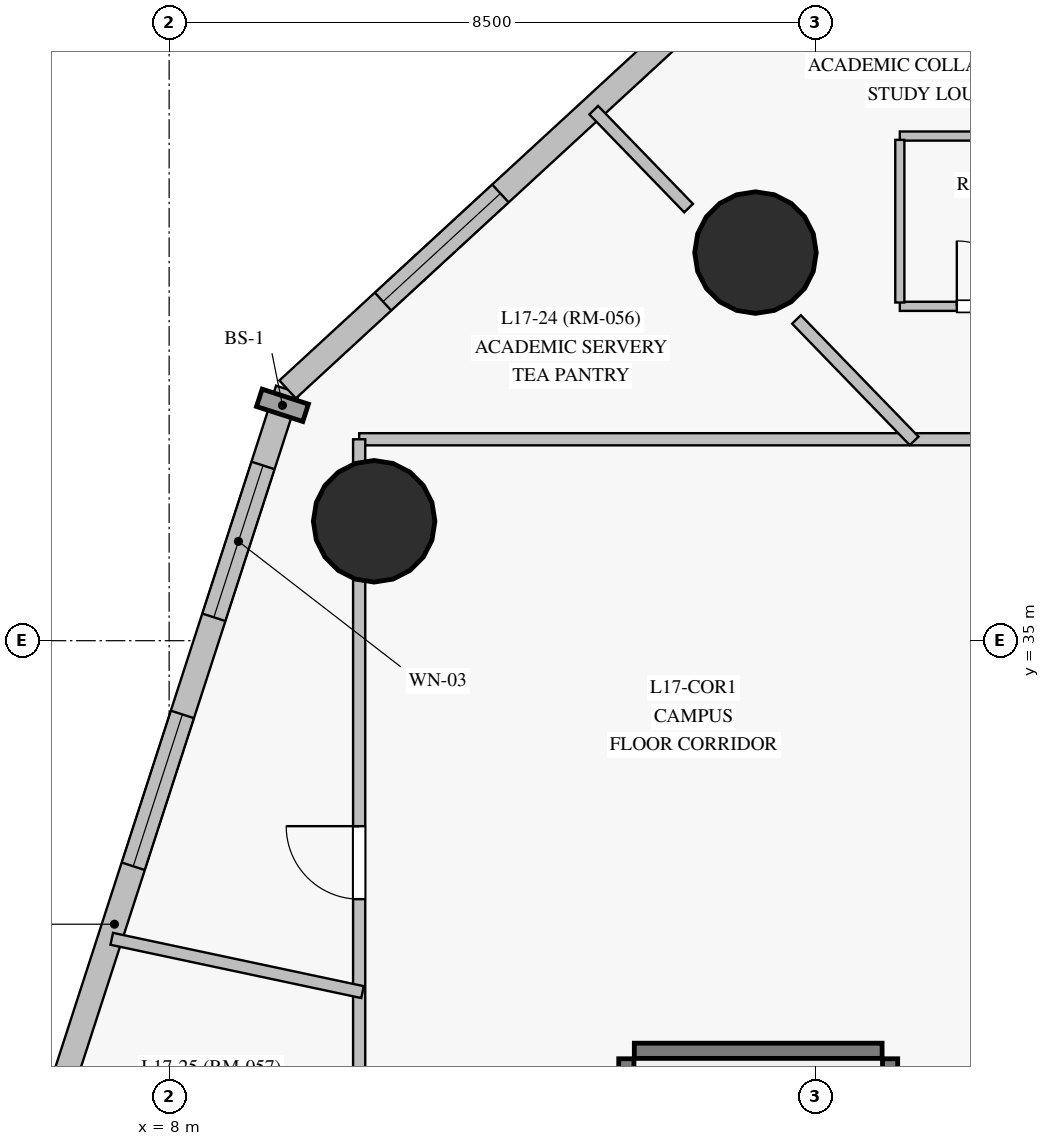
"""IFC4 building model, lengths in metres.
Left out: names, types, materials, properties, quantities, classifications, styles, units other than length and angle.
Written with IfcOpenShell. Run it as: python <this file> out.ifc"""

import sys

from ifc_helpers import new_model, si_unit, direction, frame, frame_2d, origin, origin_with_axes, origin_2d, place, context, subcontext, project, spatial, rectangle, circle, extrude, source, transform, mapped, element, fill, save


model = new_model("IFC4")
c1 = context("Model", 3, precision=1e-05, world=origin(), true_north=direction((0.0, 1.0)))
c2 = subcontext(c1, "Body", "Model", "MODEL_VIEW")
j1 = project(units=[si_unit("LENGTHUNIT", "METRE"), si_unit("PLANEANGLEUNIT", "RADIAN")], contexts=[c1])
p1 = place(None, origin())
s1 = spatial("IfcSite", under=j1, at=p1, CompositionType="ELEMENT")
p2 = place(p1, origin())
s2 = spatial("IfcBuilding", under=s1, at=p2, CompositionType="ELEMENT")
p3 = place(p2, frame((0.0, 0.0, 66.1)))
s3 = spatial("IfcBuildingStorey", under=s2, at=p3, CompositionType="ELEMENT", Elevation=66.1)
m1 = source(origin_with_axes(), c2, "Body", "SweptSolid", [
    extrude(circle(Radius=0.8, at=origin_2d()), origin(), (0.0, 0.0, 1.0), 3.6),
])
for number, where, z_axis, x_axis in (
    (1, (15.714, 40.106, 0.0), (0.0, 0.0, 1.0), (1.0, 0.0, 0.0)),
    (2, (10.697, 36.571, 0.0), (0.0, 0.0, 1.0), (1.0, 0.0, 0.0)),
):
    element("IfcColumn", number, at=place(p3, frame(where, z_axis=z_axis, x_axis=x_axis)), inside=s3, PredefinedType="COLUMN", context=c2, shape_type="MappedRepresentation", body=[
        mapped(m1, transform((0.0, 0.0, 0.0), scale=1.0)),
    ])
p4 = place(p3, frame((9.559, 38.306, 0.0), z_axis=(0.0, 0.0, 1.0), x_axis=(-0.30804045588, -0.95137325879, 0.0)))
e3 = element("IfcWall", 3, at=p4, inside=s3, PredefinedType="SOLIDWALL", context=c2, shape_type="SweptSolid", body=[
    extrude(rectangle(XDim=14.791, YDim=0.32, at=frame_2d((7.396, 0.0))), origin(), (0.0, 0.0, 1.0), 3.35),
])
p5 = place(p4, frame((1.052, 0.0, 0.85)))
e4 = element("IfcOpeningElement", 4, at=p5, cuts=e3, PredefinedType="OPENING", context=c2, shape_type="SweptSolid", body=[
    extrude(rectangle(XDim=2.1, YDim=1.95, at=frame_2d((1.05, 0.975))), frame((0.0, 0.17, 0.0), z_axis=(0.0, -1.0, 0.0), x_axis=(1.0, 0.0, 0.0)), (0.0, 0.0, 1.0), 0.34),
])
p6 = place(p4, frame((4.494, 0.0, 0.85)))
e5 = element("IfcOpeningElement", 5, at=p6, cuts=e3, PredefinedType="OPENING", context=c2, shape_type="SweptSolid", body=[
    extrude(rectangle(XDim=2.1, YDim=1.95, at=frame_2d((1.05, 0.975))), frame((0.0, 0.17, 0.0), z_axis=(0.0, -1.0, 0.0), x_axis=(1.0, 0.0, 0.0)), (0.0, 0.0, 1.0), 0.34),
])
p7 = place(p4, frame((10.022, 0.0, 0.85)))
e6 = element("IfcOpeningElement", 6, at=p7, cuts=e3, PredefinedType="OPENING", context=c2, shape_type="SweptSolid", body=[
    extrude(rectangle(XDim=2.1, YDim=1.95, at=frame_2d((1.05, 0.975))), frame((0.0, 0.17, 0.0), z_axis=(0.0, -1.0, 0.0), x_axis=(1.0, 0.0, 0.0)), (0.0, 0.0, 1.0), 0.34),
])
p8 = place(p3, frame((18.293, 46.348, 0.0), z_axis=(0.0, 0.0, 1.0), x_axis=(-0.735624378621, -0.677389676316, 0.0)))
e7 = element("IfcWall", 7, at=p8, inside=s3, PredefinedType="SOLIDWALL", context=c2, shape_type="SweptSolid", body=[
    extrude(rectangle(XDim=11.873, YDim=0.32, at=frame_2d((5.937, 0.0))), origin(), (0.0, 0.0, 1.0), 3.35),
])
p9 = place(p8, frame((2.19, 0.0, 0.85)))
e8 = element("IfcOpeningElement", 8, at=p9, cuts=e7, PredefinedType="OPENING", context=c2, shape_type="SweptSolid", body=[
    extrude(rectangle(XDim=2.1, YDim=1.95, at=frame_2d((1.05, 0.975))), frame((0.0, 0.17, 0.0), z_axis=(0.0, -1.0, 0.0), x_axis=(1.0, 0.0, 0.0)), (0.0, 0.0, 1.0), 0.34),
])
p10 = place(p8, frame((8.067, 0.0, 0.85)))
e9 = element("IfcOpeningElement", 9, at=p10, cuts=e7, PredefinedType="OPENING", context=c2, shape_type="SweptSolid", body=[
    extrude(rectangle(XDim=2.1, YDim=1.95, at=frame_2d((1.05, 0.975))), frame((0.0, 0.17, 0.0), z_axis=(0.0, -1.0, 0.0), x_axis=(1.0, 0.0, 0.0)), (0.0, 0.0, 1.0), 0.34),
])
p11 = place(p3, frame((14.015, 22.15, 0.0), z_axis=(0.0, 0.0, 1.0), x_axis=(0.0, 1.0, 0.0)))
e10 = element("IfcWall", 10, at=p11, inside=s3, PredefinedType="SHEAR", context=c2, shape_type="SweptSolid", body=[
    extrude(rectangle(XDim=7.35, YDim=0.2, at=frame_2d((3.675, 0.0))), origin(), (0.0, 0.0, 1.0), 3.35),
])
p12 = place(p3, frame((17.485, 22.15, 0.0), z_axis=(0.0, 0.0, 1.0), x_axis=(0.0, 1.0, 0.0)))
e11 = element("IfcWall", 11, at=p12, inside=s3, PredefinedType="SHEAR", context=c2, shape_type="SweptSolid", body=[
    extrude(rectangle(XDim=7.35, YDim=0.2, at=frame_2d((3.675, 0.0))), origin(), (0.0, 0.0, 1.0), 3.35),
])
p13 = place(p12, frame((0.35, 0.0, 0.0)))
e12 = element("IfcOpeningElement", 12, at=p13, cuts=e11, PredefinedType="OPENING", context=c2, shape_type="SweptSolid", body=[
    extrude(rectangle(XDim=1.15, YDim=2.15, at=frame_2d((0.575, 1.075))), frame((0.0, 0.11, 0.0), z_axis=(0.0, -1.0, 0.0), x_axis=(1.0, 0.0, 0.0)), (0.0, 0.0, 1.0), 0.22),
])
p14 = place(p3, frame((14.12, 29.605, 0.0), z_axis=(0.0, 0.0, 1.0), x_axis=(1.0, 0.0, 0.0)))
e13 = element("IfcWall", 13, at=p14, inside=s3, PredefinedType="SHEAR", context=c2, shape_type="SweptSolid", body=[
    extrude(rectangle(XDim=3.26, YDim=0.2, at=frame_2d((1.63, 0.0))), origin(), (0.0, 0.0, 1.0), 3.35),
])
p15 = place(p3, frame((10.5, 37.65, 0.0), z_axis=(0.0, 0.0, 1.0), x_axis=(1.0, 0.0, 0.0)))
e14 = element("IfcWall", 14, at=p15, inside=s3, PredefinedType="PARTITIONING", context=c2, shape_type="SweptSolid", body=[
    extrude(rectangle(XDim=29.75, YDim=0.16, at=frame_2d((14.875, 0.0))), origin(), (0.0, 0.0, 1.0), 2.75),
])
p16 = place(p15, frame((27.85, 0.0, 0.0)))
e15 = element("IfcOpeningElement", 15, at=p16, cuts=e14, PredefinedType="OPENING", context=c2, shape_type="SweptSolid", body=[
    extrude(rectangle(XDim=0.95, YDim=2.15, at=frame_2d((0.475, 1.075))), frame((0.0, 0.09, 0.0), z_axis=(0.0, -1.0, 0.0), x_axis=(1.0, 0.0, 0.0)), (0.0, 0.0, 1.0), 0.18),
])
p17 = place(p15, frame((25.159, 0.0, 0.0)))
e16 = element("IfcOpeningElement", 16, at=p17, cuts=e14, PredefinedType="OPENING", context=c2, shape_type="SweptSolid", body=[
    extrude(rectangle(XDim=0.96, YDim=2.15, at=frame_2d((0.48, 1.075))), frame((0.0, 0.09, 0.0), z_axis=(0.0, -1.0, 0.0), x_axis=(1.0, 0.0, 0.0)), (0.0, 0.0, 1.0), 0.18),
])
p18 = place(p15, frame((21.837, 0.0, 0.0)))
e17 = element("IfcOpeningElement", 17, at=p18, cuts=e14, PredefinedType="OPENING", context=c2, shape_type="SweptSolid", body=[
    extrude(rectangle(XDim=0.95, YDim=2.15, at=frame_2d((0.475, 1.075))), frame((0.0, 0.09, 0.0), z_axis=(0.0, -1.0, 0.0), x_axis=(1.0, 0.0, 0.0)), (0.0, 0.0, 1.0), 0.18),
])
p19 = place(p15, frame((18.863, 0.0, 0.0)))
e18 = element("IfcOpeningElement", 18, at=p19, cuts=e14, PredefinedType="OPENING", context=c2, shape_type="SweptSolid", body=[
    extrude(rectangle(XDim=0.95, YDim=2.15, at=frame_2d((0.475, 1.075))), frame((0.0, 0.09, 0.0), z_axis=(0.0, -1.0, 0.0), x_axis=(1.0, 0.0, 0.0)), (0.0, 0.0, 1.0), 0.18),
])
p20 = place(p15, frame((15.14, 0.0, 0.0)))
e19 = element("IfcOpeningElement", 19, at=p20, cuts=e14, PredefinedType="OPENING", context=c2, shape_type="SweptSolid", body=[
    extrude(rectangle(XDim=0.96, YDim=2.15, at=frame_2d((0.48, 1.075))), frame((0.0, 0.09, 0.0), z_axis=(0.0, -1.0, 0.0), x_axis=(1.0, 0.0, 0.0)), (0.0, 0.0, 1.0), 0.18),
])
p21 = place(p15, frame((13.176, 0.0, 0.0)))
e20 = element("IfcOpeningElement", 20, at=p21, cuts=e14, PredefinedType="OPENING", context=c2, shape_type="SweptSolid", body=[
    extrude(rectangle(XDim=0.95, YDim=2.15, at=frame_2d((0.475, 1.075))), frame((0.0, 0.09, 0.0), z_axis=(0.0, -1.0, 0.0), x_axis=(1.0, 0.0, 0.0)), (0.0, 0.0, 1.0), 0.18),
])
p22 = place(p15, frame((9.938, 0.0, 0.0)))
e21 = element("IfcOpeningElement", 21, at=p22, cuts=e14, PredefinedType="OPENING", context=c2, shape_type="SweptSolid", body=[
    extrude(rectangle(XDim=0.95, YDim=2.15, at=frame_2d((0.475, 1.075))), frame((0.0, 0.09, 0.0), z_axis=(0.0, -1.0, 0.0), x_axis=(1.0, 0.0, 0.0)), (0.0, 0.0, 1.0), 0.18),
])
p23 = place(p3, frame((10.5, 15.35, 0.0), z_axis=(0.0, 0.0, 1.0), x_axis=(0.0, 1.0, 0.0)))
e22 = element("IfcWall", 22, at=p23, inside=s3, PredefinedType="PARTITIONING", context=c2, shape_type="SweptSolid", body=[
    extrude(rectangle(XDim=22.3, YDim=0.16, at=frame_2d((11.15, 0.0))), origin(), (0.0, 0.0, 1.0), 2.75),
])
p24 = place(p23, frame((7.33, 0.0, 0.0)))
e23 = element("IfcOpeningElement", 23, at=p24, cuts=e22, PredefinedType="OPENING", context=c2, shape_type="SweptSolid", body=[
    extrude(rectangle(XDim=0.95, YDim=2.15, at=frame_2d((0.475, 1.075))), frame((0.0, 0.09, 0.0), z_axis=(0.0, -1.0, 0.0), x_axis=(1.0, 0.0, 0.0)), (0.0, 0.0, 1.0), 0.18),
])
p25 = place(p23, frame((16.25, 0.0, 0.0)))
e24 = element("IfcOpeningElement", 24, at=p25, cuts=e22, PredefinedType="OPENING", context=c2, shape_type="SweptSolid", body=[
    extrude(rectangle(XDim=0.96, YDim=2.15, at=frame_2d((0.48, 1.075))), frame((0.0, 0.09, 0.0), z_axis=(0.0, -1.0, 0.0), x_axis=(1.0, 0.0, 0.0)), (0.0, 0.0, 1.0), 0.18),
])
p26 = place(p23, frame((10.675, 0.0, 0.0)))
e25 = element("IfcOpeningElement", 25, at=p26, cuts=e22, PredefinedType="OPENING", context=c2, shape_type="SweptSolid", body=[
    extrude(rectangle(XDim=0.95, YDim=2.15, at=frame_2d((0.475, 1.075))), frame((0.0, 0.09, 0.0), z_axis=(0.0, -1.0, 0.0), x_axis=(1.0, 0.0, 0.0)), (0.0, 0.0, 1.0), 0.18),
])
p27 = place(p3, frame((10.544, 30.377, 0.0), z_axis=(0.0, 0.0, 1.0), x_axis=(-0.978166393073, 0.207823260158, 0.0)))
e26 = element("IfcWall", 26, at=p27, inside=s3, PredefinedType="PARTITIONING", context=c2, shape_type="SweptSolid", body=[
    extrude(rectangle(XDim=3.373, YDim=0.16, at=frame_2d((1.687, 0.0))), origin(), (0.0, 0.0, 1.0), 3.35),
])
p28 = place(p3, frame((17.613, 39.399, 0.0), z_axis=(0.0, 0.0, 1.0), x_axis=(1.0, 0.0, 0.0)))
e27 = element("IfcWall", 27, at=p28, inside=s3, PredefinedType="PARTITIONING", context=c2, shape_type="SweptSolid", body=[
    extrude(rectangle(XDim=2.36, YDim=0.12, at=frame_2d((1.18, 0.0))), origin(), (0.0, 0.0, 1.0), 2.75),
])
p29 = place(p28, frame((0.75, 0.0, 0.0)))
e28 = element("IfcOpeningElement", 28, at=p29, cuts=e27, PredefinedType="OPENING", context=c2, shape_type="SweptSolid", body=[
    extrude(rectangle(XDim=0.86, YDim=2.1, at=frame_2d((0.43, 1.05))), frame((0.0, 0.07, 0.0), z_axis=(0.0, -1.0, 0.0), x_axis=(1.0, 0.0, 0.0)), (0.0, 0.0, 1.0), 0.14),
])
p30 = place(p3, frame((19.973, 41.639, 0.0), z_axis=(0.0, 0.0, 1.0), x_axis=(-1.0, 0.0, 0.0)))
e29 = element("IfcWall", 29, at=p30, inside=s3, PredefinedType="PARTITIONING", context=c2, shape_type="SweptSolid", body=[
    extrude(rectangle(XDim=2.36, YDim=0.12, at=frame_2d((1.18, 0.0))), origin(), (0.0, 0.0, 1.0), 2.75),
])
p31 = place(p3, frame((17.802, 37.628, 0.0), z_axis=(0.0, 0.0, 1.0), x_axis=(-0.695823523946, 0.718212798218, 0.0)))
e30 = element("IfcWall", 30, at=p31, inside=s3, PredefinedType="PARTITIONING", context=c2, shape_type="SweptSolid", body=[
    extrude(rectangle(XDim=2.225, YDim=0.16, at=frame_2d((1.112, 0.0))), origin(), (0.0, 0.0, 1.0), 2.7),
])
p32 = place(p3, frame((17.613, 41.589, 0.0), z_axis=(0.0, 0.0, 1.0), x_axis=(0.0, -1.0, 0.0)))
e31 = element("IfcWall", 31, at=p32, inside=s3, PredefinedType="PARTITIONING", context=c2, shape_type="SweptSolid", body=[
    extrude(rectangle(XDim=2.14, YDim=0.12, at=frame_2d((1.07, 0.0))), origin(), (0.0, 0.0, 1.0), 3.35),
])
p33 = place(p3, frame((14.834, 40.691, 0.0), z_axis=(0.0, 0.0, 1.0), x_axis=(-0.695858838833, 0.718178582539, 0.0)))
e32 = element("IfcWall", 32, at=p33, inside=s3, PredefinedType="PARTITIONING", context=c2, shape_type="SweptSolid", body=[
    extrude(rectangle(XDim=1.794, YDim=0.16, at=frame_2d((0.897, 0.0))), origin(), (0.0, 0.0, 1.0), 3.35),
])
m2 = source(origin_with_axes(), c2, "Body", "SweptSolid", [
    extrude(rectangle(XDim=2.1, YDim=1.95, at=frame_2d((1.05, 0.975))), frame((0.0, 0.03, 0.0), z_axis=(0.0, -1.0, 0.0), x_axis=(1.0, 0.0, 0.0)), (0.0, 0.0, 1.0), 0.06),
])
p34 = place(p5, origin())
e33 = element("IfcWindow", 33, at=p34, inside=s3, PartitioningType="SINGLE_PANEL", PredefinedType="WINDOW", context=c2, shape_type="MappedRepresentation", body=[
    mapped(m2, transform((0.0, 0.0, 0.0), scale=1.0)),
])
fill(e4, e33)
p35 = place(p6, origin())
e34 = element("IfcWindow", 34, at=p35, inside=s3, PartitioningType="SINGLE_PANEL", PredefinedType="WINDOW", context=c2, shape_type="MappedRepresentation", body=[
    mapped(m2, transform((0.0, 0.0, 0.0), scale=1.0)),
])
fill(e5, e34)
p36 = place(p10, origin())
e35 = element("IfcWindow", 35, at=p36, inside=s3, PartitioningType="SINGLE_PANEL", PredefinedType="WINDOW", context=c2, shape_type="MappedRepresentation", body=[
    mapped(m2, transform((0.0, 0.0, 0.0), scale=1.0)),
])
fill(e9, e35)
m3 = source(origin_with_axes(), c2, "Body", "SweptSolid", [
    extrude(rectangle(XDim=0.86, YDim=2.1, at=frame_2d((0.43, 1.05))), frame((0.0, 0.025, 0.0), z_axis=(0.0, -1.0, 0.0), x_axis=(1.0, 0.0, 0.0)), (0.0, 0.0, 1.0), 0.05),
])
p37 = place(p29, origin())
e36 = element("IfcDoor", 36, at=p37, inside=s3, OperationType="SINGLE_SWING_LEFT", PredefinedType="DOOR", context=c2, shape_type="MappedRepresentation", body=[
    mapped(m3, transform((0.0, 0.0, 0.0), scale=1.0)),
])
fill(e28, e36)
m4 = source(origin_with_axes(), c2, "Body", "SweptSolid", [
    extrude(rectangle(XDim=0.96, YDim=2.15, at=frame_2d((0.48, 1.075))), frame((0.0, 0.025, 0.0), z_axis=(0.0, -1.0, 0.0), x_axis=(1.0, 0.0, 0.0)), (0.0, 0.0, 1.0), 0.05),
])
p38 = place(p25, origin())
e37 = element("IfcDoor", 37, at=p38, inside=s3, OperationType="SINGLE_SWING_RIGHT", PredefinedType="DOOR", context=c2, shape_type="MappedRepresentation", body=[
    mapped(m4, transform((0.0, 0.0, 0.0), scale=1.0)),
])
fill(e24, e37)
save(model, sys.argv[1])
